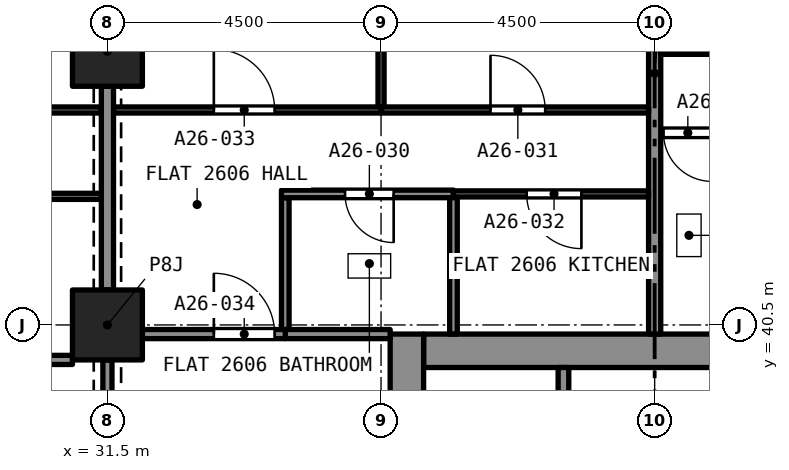
"""IFC4 building model, lengths in metres.
Left out: names, types, materials, properties, quantities, classifications, styles, units other than length and angle.
Written with IfcOpenShell. Run it as: python <this file> out.ifc"""

import sys

from ifc_helpers import new_model, si_unit, direction, frame, frame_2d, origin, origin_2d, place, context, subcontext, project, spatial, rectangle, extrude, element, fill, save


model = new_model("IFC4")
c1 = context("Model", 3, precision=1e-05, world=origin(), true_north=direction((0.0, 1.0)))
c2 = subcontext(c1, "Body", "Model", "MODEL_VIEW")
j1 = project(units=[si_unit("LENGTHUNIT", "METRE"), si_unit("PLANEANGLEUNIT", "RADIAN")], contexts=[c1])
p1 = place(None, origin())
s1 = spatial("IfcSite", under=j1, at=p1, CompositionType="ELEMENT")
p2 = place(p1, origin())
s2 = spatial("IfcBuilding", under=s1, at=p2, CompositionType="ELEMENT")
p3 = place(p2, frame((0.0, 0.0, 96.0)))
s3 = spatial("IfcBuildingStorey", under=s2, at=p3, CompositionType="ELEMENT", Elevation=96.0)
for number, where, z_axis, x_axis in (
    (1, (31.5, 40.5, 0.0), (0.0, 0.0, 1.0), (1.0, 0.0, 0.0)),
    (2, (31.5, 45.0, 0.0), (0.0, 0.0, 1.0), (1.0, 0.0, 0.0)),
):
    element("IfcColumn", number, at=place(p3, frame(where, z_axis=z_axis, x_axis=x_axis)), inside=s3, PredefinedType="COLUMN", context=c2, shape_type="SweptSolid", body=[
        extrude(rectangle(XDim=1.15, YDim=1.15, at=origin_2d()), origin(), (0.0, 0.0, 1.0), 3.2),
    ])
p4 = place(p3, frame((36.7, 40.075, 0.0), z_axis=(0.0, 0.0, 1.0), x_axis=(1.0, 0.0, 0.0)))
e3 = element("IfcWall", 3, at=p4, inside=s3, PredefinedType="SOLIDWALL", context=c2, shape_type="SweptSolid", body=[
    extrude(rectangle(XDim=7.6, YDim=0.55, at=frame_2d((3.8, 0.0))), origin(), (0.0, 0.0, 1.0), 3.2),
])
p5 = place(p3, frame((36.425, 27.15, 0.0), z_axis=(0.0, 0.0, 1.0), x_axis=(0.0, 1.0, 0.0)))
e4 = element("IfcWall", 4, at=p5, inside=s3, PredefinedType="SOLIDWALL", context=c2, shape_type="SweptSolid", body=[
    extrude(rectangle(XDim=13.2, YDim=0.55, at=frame_2d((6.6, 0.0))), origin(), (0.0, 0.0, 1.0), 3.2),
])
p6 = place(p5, frame((8.8, 0.0, 0.0)))
e5 = element("IfcOpeningElement", 5, at=p6, cuts=e4, PredefinedType="OPENING", context=c2, shape_type="SweptSolid", body=[
    extrude(rectangle(XDim=1.2, YDim=2.1, at=frame_2d((0.6, 1.05))), frame((0.0, 0.285, 0.0), z_axis=(0.0, -1.0, 0.0), x_axis=(1.0, 0.0, 0.0)), (0.0, 0.0, 1.0), 0.57),
])
p7 = place(p3, frame((41.591, 43.66, 0.0), z_axis=(0.0, 0.0, 1.0), x_axis=(-1.0, 0.0, 0.0)))
e6 = element("IfcWall", 6, at=p7, inside=s3, PredefinedType="PARTITIONING", context=c2, shape_type="SweptSolid", body=[
    extrude(rectangle(XDim=0.991, YDim=0.125, at=frame_2d((0.495, 0.0))), origin(), (0.0, 0.0, 1.0), 2.9),
])
p8 = place(p7, frame((0.146, 0.0, 0.0)))
e7 = element("IfcOpeningElement", 7, at=p8, cuts=e6, PredefinedType="OPENING", context=c2, shape_type="SweptSolid", body=[
    extrude(rectangle(XDim=0.8, YDim=2.1, at=frame_2d((0.4, 1.05))), frame((0.0, 0.073, 0.0), z_axis=(0.0, -1.0, 0.0), x_axis=(1.0, 0.0, 0.0)), (0.0, 0.0, 1.0), 0.145),
])
p9 = place(p3, frame((40.5, 40.35, 0.0), z_axis=(0.0, 0.0, 1.0), x_axis=(0.0, 1.0, 0.0)))
e8 = element("IfcWall", 8, at=p9, inside=s3, PredefinedType="PARTITIONING", context=c2, shape_type="SweptSolid", body=[
    extrude(rectangle(XDim=8.575, YDim=0.2, at=frame_2d((4.288, 0.0))), origin(), (0.0, 0.0, 1.0), 2.9),
])
p10 = place(p3, frame((40.6, 45.0, 0.0), z_axis=(0.0, 0.0, 1.0), x_axis=(1.0, 0.0, 0.0)))
e9 = element("IfcWall", 9, at=p10, inside=s3, PredefinedType="PARTITIONING", context=c2, shape_type="SweptSolid", body=[
    extrude(rectangle(XDim=4.4, YDim=0.1, at=frame_2d((2.2, 0.0))), origin(), (0.0, 0.0, 1.0), 2.9),
])
p11 = place(p10, frame((1.7, 0.0, 0.0)))
e10 = element("IfcOpeningElement", 10, at=p11, cuts=e9, PredefinedType="OPENING", context=c2, shape_type="SweptSolid", body=[
    extrude(rectangle(XDim=0.9, YDim=2.1, at=frame_2d((0.45, 1.05))), frame((0.0, 0.06, 0.0), z_axis=(0.0, -1.0, 0.0), x_axis=(1.0, 0.0, 0.0)), (0.0, 0.0, 1.0), 0.12),
])
p12 = place(p3, frame((34.425, 40.425, 0.0), z_axis=(0.0, 0.0, 1.0), x_axis=(0.0, 1.0, 0.0)))
e11 = element("IfcWall", 11, at=p12, inside=s3, PredefinedType="PARTITIONING", context=c2, shape_type="SweptSolid", body=[
    extrude(rectangle(XDim=2.167, YDim=0.125, at=frame_2d((1.084, 0.0))), origin(), (0.0, 0.0, 1.0), 2.9),
])
p13 = place(p3, frame((37.19, 42.655, 0.0), z_axis=(0.0, 0.0, 1.0), x_axis=(-1.0, 0.0, 0.0)))
e12 = element("IfcWall", 12, at=p13, inside=s3, PredefinedType="PARTITIONING", context=c2, shape_type="SweptSolid", body=[
    extrude(rectangle(XDim=2.828, YDim=0.125, at=frame_2d((1.414, 0.0))), origin(), (0.0, 0.0, 1.0), 2.9),
])
p14 = place(p13, frame((0.983, 0.0, 0.0)))
e13 = element("IfcOpeningElement", 13, at=p14, cuts=e12, PredefinedType="OPENING", context=c2, shape_type="SweptSolid", body=[
    extrude(rectangle(XDim=0.8, YDim=2.1, at=frame_2d((0.4, 1.05))), frame((0.0, 0.073, 0.0), z_axis=(0.0, -1.0, 0.0), x_axis=(1.0, 0.0, 0.0)), (0.0, 0.0, 1.0), 0.145),
])
p15 = place(p3, frame((37.191, 40.35, 0.0), z_axis=(0.0, 0.0, 1.0), x_axis=(0.0, 1.0, 0.0)))
e14 = element("IfcWall", 14, at=p15, inside=s3, PredefinedType="PARTITIONING", context=c2, shape_type="SweptSolid", body=[
    extrude(rectangle(XDim=2.242, YDim=0.125, at=frame_2d((1.121, 0.0))), origin(), (0.0, 0.0, 1.0), 2.9),
])
p16 = place(p3, frame((34.425, 40.35, 0.0), z_axis=(0.0, 0.0, 1.0), x_axis=(1.0, 0.0, 0.0)))
e15 = element("IfcWall", 15, at=p16, inside=s3, PredefinedType="PARTITIONING", context=c2, shape_type="SweptSolid", body=[
    extrude(rectangle(XDim=1.725, YDim=0.15, at=frame_2d((0.862, 0.0))), origin(), (0.0, 0.0, 1.0), 2.9),
])
p17 = place(p3, frame((36.0, 44.035, 0.0), z_axis=(0.0, 0.0, 1.0), x_axis=(1.0, 0.0, 0.0)))
e16 = element("IfcWall", 16, at=p17, inside=s3, PredefinedType="PARTITIONING", context=c2, shape_type="SweptSolid", body=[
    extrude(rectangle(XDim=4.4, YDim=0.1, at=frame_2d((2.2, 0.0))), origin(), (0.0, 0.0, 1.0), 2.9),
])
p18 = place(p17, frame((1.8, 0.0, 0.0)))
e17 = element("IfcOpeningElement", 17, at=p18, cuts=e16, PredefinedType="OPENING", context=c2, shape_type="SweptSolid", body=[
    extrude(rectangle(XDim=0.9, YDim=2.1, at=frame_2d((0.45, 1.05))), frame((0.0, 0.06, 0.0), z_axis=(0.0, -1.0, 0.0), x_axis=(1.0, 0.0, 0.0)), (0.0, 0.0, 1.0), 0.12),
])
p19 = place(p3, frame((36.0, 44.085, 0.0), z_axis=(0.0, 0.0, 1.0), x_axis=(0.0, 1.0, 0.0)))
e18 = element("IfcWall", 18, at=p19, inside=s3, PredefinedType="PARTITIONING", context=c2, shape_type="SweptSolid", body=[
    extrude(rectangle(XDim=4.84, YDim=0.1, at=frame_2d((2.42, 0.0))), origin(), (0.0, 0.0, 1.0), 2.9),
])
p20 = place(p3, frame((40.4, 42.655, 0.0), z_axis=(0.0, 0.0, 1.0), x_axis=(-1.0, 0.0, 0.0)))
e19 = element("IfcWall", 19, at=p20, inside=s3, PredefinedType="PARTITIONING", context=c2, shape_type="SweptSolid", body=[
    extrude(rectangle(XDim=3.209, YDim=0.1, at=frame_2d((1.605, 0.0))), origin(), (0.0, 0.0, 1.0), 2.9),
])
p21 = place(p20, frame((1.105, 0.0, 0.0)))
e20 = element("IfcOpeningElement", 20, at=p21, cuts=e19, PredefinedType="OPENING", context=c2, shape_type="SweptSolid", body=[
    extrude(rectangle(XDim=0.9, YDim=2.1, at=frame_2d((0.45, 1.05))), frame((0.0, 0.06, 0.0), z_axis=(0.0, -1.0, 0.0), x_axis=(1.0, 0.0, 0.0)), (0.0, 0.0, 1.0), 0.12),
])
p22 = place(p3, frame((31.6, 44.035, 0.0), z_axis=(0.0, 0.0, 1.0), x_axis=(1.0, 0.0, 0.0)))
e21 = element("IfcWall", 21, at=p22, inside=s3, PredefinedType="PARTITIONING", context=c2, shape_type="SweptSolid", body=[
    extrude(rectangle(XDim=4.4, YDim=0.1, at=frame_2d((2.2, 0.0))), origin(), (0.0, 0.0, 1.0), 2.9),
])
p23 = place(p22, frame((1.65, 0.0, 0.0)))
e22 = element("IfcOpeningElement", 22, at=p23, cuts=e21, PredefinedType="OPENING", context=c2, shape_type="SweptSolid", body=[
    extrude(rectangle(XDim=1.0, YDim=2.1, at=frame_2d((0.5, 1.05))), frame((0.0, 0.06, 0.0), z_axis=(0.0, -1.0, 0.0), x_axis=(1.0, 0.0, 0.0)), (0.0, 0.0, 1.0), 0.12),
])
p24 = place(p3, frame((31.5, 41.075, 0.0), z_axis=(0.0, 0.0, 1.0), x_axis=(0.0, 1.0, 0.0)))
e23 = element("IfcWall", 23, at=p24, inside=s3, PredefinedType="PARTITIONING", context=c2, shape_type="SweptSolid", body=[
    extrude(rectangle(XDim=3.35, YDim=0.2, at=frame_2d((1.675, 0.0))), origin(), (0.0, 0.0, 1.0), 2.38),
])
p25 = place(p3, frame((32.075, 40.35, 0.0), z_axis=(0.0, 0.0, 1.0), x_axis=(1.0, 0.0, 0.0)))
e24 = element("IfcWall", 24, at=p25, inside=s3, PredefinedType="PARTITIONING", context=c2, shape_type="SweptSolid", body=[
    extrude(rectangle(XDim=2.35, YDim=0.15, at=frame_2d((1.175, 0.0))), origin(), (0.0, 0.0, 1.0), 2.9),
])
p26 = place(p25, frame((1.175, 0.0, 0.0)))
e25 = element("IfcOpeningElement", 25, at=p26, cuts=e24, PredefinedType="OPENING", context=c2, shape_type="SweptSolid", body=[
    extrude(rectangle(XDim=1.0, YDim=2.1, at=frame_2d((0.5, 1.05))), frame((0.0, 0.085, 0.0), z_axis=(0.0, -1.0, 0.0), x_axis=(1.0, 0.0, 0.0)), (0.0, 0.0, 1.0), 0.17),
])
p27 = place(p3, frame((27.0, 44.035, 0.0), z_axis=(0.0, 0.0, 1.0), x_axis=(1.0, 0.0, 0.0)))
e26 = element("IfcWall", 26, at=p27, inside=s3, PredefinedType="PARTITIONING", context=c2, shape_type="SweptSolid", body=[
    extrude(rectangle(XDim=4.4, YDim=0.1, at=frame_2d((2.2, 0.0))), origin(), (0.0, 0.0, 1.0), 2.75),
])
p28 = place(p27, frame((1.8, 0.0, 0.0)))
e27 = element("IfcOpeningElement", 27, at=p28, cuts=e26, PredefinedType="OPENING", context=c2, shape_type="SweptSolid", body=[
    extrude(rectangle(XDim=0.9, YDim=2.1, at=frame_2d((0.45, 1.05))), frame((0.0, 0.06, 0.0), z_axis=(0.0, -1.0, 0.0), x_axis=(1.0, 0.0, 0.0)), (0.0, 0.0, 1.0), 0.12),
])
p29 = place(p3, frame((31.4, 42.615, 0.0), z_axis=(0.0, 0.0, 1.0), x_axis=(-1.0, 0.0, 0.0)))
e28 = element("IfcWall", 28, at=p29, inside=s3, PredefinedType="PARTITIONING", context=c2, shape_type="SweptSolid", body=[
    extrude(rectangle(XDim=9.4, YDim=0.1, at=frame_2d((4.7, 0.0))), origin(), (0.0, 0.0, 1.0), 2.75),
])
p30 = place(p29, frame((4.175, 0.0, 0.0)))
e29 = element("IfcOpeningElement", 29, at=p30, cuts=e28, PredefinedType="OPENING", context=c2, shape_type="SweptSolid", body=[
    extrude(rectangle(XDim=0.9, YDim=2.1, at=frame_2d((0.45, 1.05))), frame((0.0, 0.06, 0.0), z_axis=(0.0, -1.0, 0.0), x_axis=(1.0, 0.0, 0.0)), (0.0, 0.0, 1.0), 0.12),
])
p31 = place(p3, frame((22.05, 39.925, 0.0), z_axis=(0.0, 0.0, 1.0), x_axis=(1.0, 0.0, 0.0)))
e30 = element("IfcWall", 30, at=p31, inside=s3, PredefinedType="PARTITIONING", context=c2, shape_type="SweptSolid", body=[
    extrude(rectangle(XDim=8.875, YDim=0.15, at=frame_2d((4.438, 0.0))), origin(), (0.0, 0.0, 1.0), 2.75),
])
p32 = place(p3, frame((31.5, 36.575, 0.0), z_axis=(0.0, 0.0, 1.0), x_axis=(0.0, 1.0, 0.0)))
e31 = element("IfcWall", 31, at=p32, inside=s3, PredefinedType="PARTITIONING", context=c2, shape_type="SweptSolid", body=[
    extrude(rectangle(XDim=3.35, YDim=0.15, at=frame_2d((1.675, 0.0))), origin(), (0.0, 0.0, 1.0), 2.38),
])
p33 = place(p32, frame((1.075, 0.0, 0.0)))
e32 = element("IfcOpeningElement", 32, at=p33, cuts=e31, PredefinedType="OPENING", context=c2, shape_type="SweptSolid", body=[
    extrude(rectangle(XDim=1.2, YDim=2.1, at=frame_2d((0.6, 1.05))), frame((0.0, 0.085, 0.0), z_axis=(0.0, -1.0, 0.0), x_axis=(1.0, 0.0, 0.0)), (0.0, 0.0, 1.0), 0.17),
])
p34 = place(p3, frame((39.0, 37.5, 0.0), z_axis=(0.0, 0.0, 1.0), x_axis=(0.0, 1.0, 0.0)))
e33 = element("IfcWall", 33, at=p34, inside=s3, PredefinedType="SOLIDWALL", context=c2, shape_type="SweptSolid", body=[
    extrude(rectangle(XDim=2.3, YDim=0.175, at=frame_2d((1.15, 0.0))), origin(), (0.0, 0.0, 1.0), 2.9),
])
p35 = place(p8, origin())
e34 = element("IfcDoor", 34, at=p35, inside=s3, OperationType="SINGLE_SWING_RIGHT", PredefinedType="DOOR", context=c2, shape_type="SweptSolid", body=[
    extrude(rectangle(XDim=0.8, YDim=2.1, at=frame_2d((0.4, 1.05))), frame((0.0, 0.025, 0.0), z_axis=(0.0, -1.0, 0.0), x_axis=(1.0, 0.0, 0.0)), (0.0, 0.0, 1.0), 0.05),
])
fill(e7, e34)
p36 = place(p14, origin())
e35 = element("IfcDoor", 35, at=p36, inside=s3, OperationType="SINGLE_SWING_LEFT", PredefinedType="DOOR", context=c2, shape_type="SweptSolid", body=[
    extrude(rectangle(XDim=0.8, YDim=2.1, at=frame_2d((0.4, 1.05))), frame((0.0, 0.025, 0.0), z_axis=(0.0, -1.0, 0.0), x_axis=(1.0, 0.0, 0.0)), (0.0, 0.0, 1.0), 0.05),
])
fill(e13, e35)
p37 = place(p18, origin())
e36 = element("IfcDoor", 36, at=p37, inside=s3, OperationType="SINGLE_SWING_RIGHT", PredefinedType="DOOR", context=c2, shape_type="SweptSolid", body=[
    extrude(rectangle(XDim=0.9, YDim=2.1, at=frame_2d((0.45, 1.05))), frame((0.0, 0.025, 0.0), z_axis=(0.0, -1.0, 0.0), x_axis=(1.0, 0.0, 0.0)), (0.0, 0.0, 1.0), 0.05),
])
fill(e17, e36)
p38 = place(p21, origin())
e37 = element("IfcDoor", 37, at=p38, inside=s3, OperationType="SINGLE_SWING_LEFT", PredefinedType="DOOR", context=c2, shape_type="SweptSolid", body=[
    extrude(rectangle(XDim=0.9, YDim=2.1, at=frame_2d((0.45, 1.05))), frame((0.0, 0.025, 0.0), z_axis=(0.0, -1.0, 0.0), x_axis=(1.0, 0.0, 0.0)), (0.0, 0.0, 1.0), 0.05),
])
fill(e20, e37)
p39 = place(p23, origin())
e38 = element("IfcDoor", 38, at=p39, inside=s3, OperationType="SINGLE_SWING_LEFT", PredefinedType="DOOR", context=c2, shape_type="SweptSolid", body=[
    extrude(rectangle(XDim=1.0, YDim=2.1, at=frame_2d((0.5, 1.05))), frame((0.0, 0.025, 0.0), z_axis=(0.0, -1.0, 0.0), x_axis=(1.0, 0.0, 0.0)), (0.0, 0.0, 1.0), 0.05),
])
fill(e22, e38)
p40 = place(p26, origin())
e39 = element("IfcDoor", 39, at=p40, inside=s3, OperationType="SINGLE_SWING_RIGHT", PredefinedType="DOOR", context=c2, shape_type="SweptSolid", body=[
    extrude(rectangle(XDim=1.0, YDim=2.1, at=frame_2d((0.5, 1.05))), frame((0.0, 0.025, 0.0), z_axis=(0.0, -1.0, 0.0), x_axis=(1.0, 0.0, 0.0)), (0.0, 0.0, 1.0), 0.05),
])
fill(e25, e39)
save(model, sys.argv[1])
